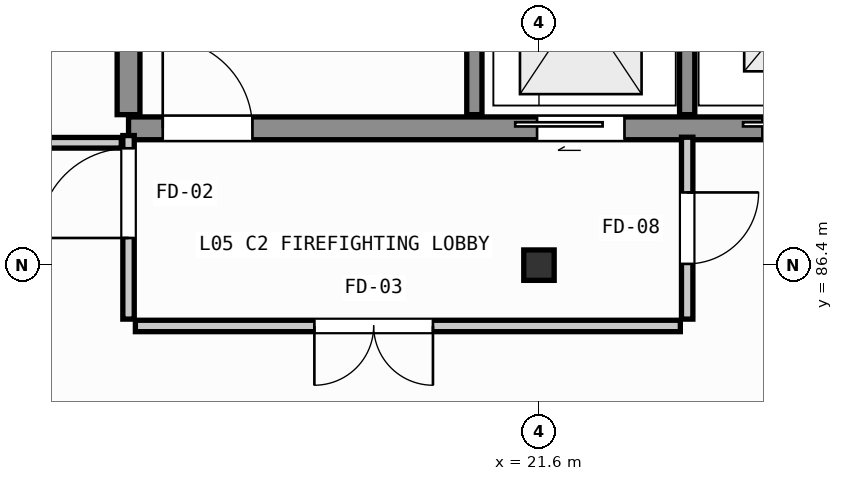
"""IFC4 building model, lengths in metres.
Left out: names, types, materials, properties, quantities, classifications, styles, units other than length and angle.
Written with IfcOpenShell. Run it as: python <this file> out.ifc"""

import sys

from ifc_helpers import new_model, si_unit, direction, frame, frame_2d, origin, origin_2d, place, context, subcontext, project, spatial, rectangle, extrude, element, fill, save


model = new_model("IFC4")
c1 = context("Model", 3, precision=1e-05, world=origin(), true_north=direction((0.0, 1.0)))
c2 = subcontext(c1, "Body", "Model", "MODEL_VIEW")
j1 = project(units=[si_unit("LENGTHUNIT", "METRE"), si_unit("PLANEANGLEUNIT", "RADIAN")], contexts=[c1])
p1 = place(None, origin())
s1 = spatial("IfcSite", under=j1, at=p1, CompositionType="ELEMENT")
p2 = place(p1, origin())
s2 = spatial("IfcBuilding", under=s1, at=p2, CompositionType="ELEMENT")
p3 = place(p2, frame((0.0, 0.0, 17.7)))
s3 = spatial("IfcBuildingStorey", under=s2, at=p3, CompositionType="ELEMENT", Elevation=17.7)
p4 = place(p3, frame((21.6, 86.4, 0.0), z_axis=(0.0, 0.0, 1.0), x_axis=(1.0, 0.0, 0.0)))
e1 = element("IfcColumn", 1, at=p4, inside=s3, PredefinedType="COLUMN", context=c2, shape_type="SweptSolid", body=[
    extrude(rectangle(XDim=0.4, YDim=0.4, at=origin_2d()), origin(), (0.0, 0.0, 1.0), 3.69),
])
p5 = place(p3, frame((16.2, 88.2, 0.0), z_axis=(0.0, 0.0, 1.0), x_axis=(1.0, 0.0, 0.0)))
e2 = element("IfcWall", 2, at=p5, inside=s3, PredefinedType="SHEAR", context=c2, shape_type="SweptSolid", body=[
    extrude(rectangle(XDim=10.8, YDim=0.3, at=frame_2d((5.4, 0.0))), origin(), (0.0, 0.0, 1.0), 3.9),
])
p6 = place(p5, frame((0.45, 0.0, 0.0)))
e3 = element("IfcOpeningElement", 3, at=p6, cuts=e2, PredefinedType="OPENING", context=c2, shape_type="SweptSolid", body=[
    extrude(rectangle(XDim=1.18, YDim=2.16, at=frame_2d((0.59, 1.08))), frame((0.0, 0.16, 0.0), z_axis=(0.0, -1.0, 0.0), x_axis=(1.0, 0.0, 0.0)), (0.0, 0.0, 1.0), 0.32),
])
p7 = place(p5, frame((5.375, 0.0, 0.0)))
e4 = element("IfcOpeningElement", 4, at=p7, cuts=e2, PredefinedType="OPENING", context=c2, shape_type="SweptSolid", body=[
    extrude(rectangle(XDim=1.15, YDim=2.15, at=frame_2d((0.575, 1.075))), frame((0.0, 0.16, 0.0), z_axis=(0.0, -1.0, 0.0), x_axis=(1.0, 0.0, 0.0)), (0.0, 0.0, 1.0), 0.32),
])
p8 = place(p5, frame((8.34, 0.0, 0.0)))
e5 = element("IfcOpeningElement", 5, at=p8, cuts=e2, PredefinedType="OPENING", context=c2, shape_type="SweptSolid", body=[
    extrude(rectangle(XDim=1.02, YDim=2.12, at=frame_2d((0.51, 1.06))), frame((0.0, 0.16, 0.0), z_axis=(0.0, -1.0, 0.0), x_axis=(1.0, 0.0, 0.0)), (0.0, 0.0, 1.0), 0.32),
])
p9 = place(p3, frame((16.2, 88.38, 0.0), z_axis=(0.0, 0.0, 1.0), x_axis=(0.0, 1.0, 0.0)))
e6 = element("IfcWall", 6, at=p9, inside=s3, PredefinedType="SHEAR", context=c2, shape_type="SweptSolid", body=[
    extrude(rectangle(XDim=6.24, YDim=0.3, at=frame_2d((3.12, 0.0))), origin(), (0.0, 0.0, 1.0), 3.9),
])
for number, where, z_axis, x_axis in (
    (7, (20.75, 88.38, 0.0), (0.0, 0.0, 1.0), (0.0, 1.0, 0.0)),
    (8, (23.55, 88.38, 0.0), (0.0, 0.0, 1.0), (0.0, 1.0, 0.0)),
):
    element("IfcWall", number, at=place(p3, frame(where, z_axis=z_axis, x_axis=x_axis)), inside=s3, PredefinedType="SHEAR", context=c2, shape_type="SweptSolid", body=[
        extrude(rectangle(XDim=3.15, YDim=0.2, at=frame_2d((1.575, 0.0))), origin(), (0.0, 0.0, 1.0), 3.9),
    ])
p10 = place(p3, frame((16.2, 85.69, 0.0), z_axis=(0.0, 0.0, 1.0), x_axis=(0.0, 1.0, 0.0)))
e9 = element("IfcWall", 9, at=p10, inside=s3, PredefinedType="PARTITIONING", context=c2, shape_type="SweptSolid", body=[
    extrude(rectangle(XDim=2.415, YDim=0.15, at=frame_2d((1.208, 0.0))), origin(), (0.0, 0.0, 1.0), 3.05),
])
p11 = place(p10, frame((1.067, 0.0, 0.0)))
e10 = element("IfcOpeningElement", 10, at=p11, cuts=e9, PredefinedType="OPENING", context=c2, shape_type="SweptSolid", body=[
    extrude(rectangle(XDim=1.18, YDim=2.16, at=frame_2d((0.59, 1.08))), frame((0.0, 0.085, 0.0), z_axis=(0.0, -1.0, 0.0), x_axis=(1.0, 0.0, 0.0)), (0.0, 0.0, 1.0), 0.17),
])
p12 = place(p3, frame((23.55, 88.083, 0.0), z_axis=(0.0, 0.0, 1.0), x_axis=(0.0, -1.0, 0.0)))
e11 = element("IfcWall", 11, at=p12, inside=s3, PredefinedType="PARTITIONING", context=c2, shape_type="SweptSolid", body=[
    extrude(rectangle(XDim=2.393, YDim=0.15, at=frame_2d((1.197, 0.0))), origin(), (0.0, 0.0, 1.0), 3.05),
])
p13 = place(p12, frame((0.727, 0.0, 0.0)))
e12 = element("IfcOpeningElement", 12, at=p13, cuts=e11, PredefinedType="OPENING", context=c2, shape_type="SweptSolid", body=[
    extrude(rectangle(XDim=0.94, YDim=2.1, at=frame_2d((0.47, 1.05))), frame((0.0, 0.085, 0.0), z_axis=(0.0, -1.0, 0.0), x_axis=(1.0, 0.0, 0.0)), (0.0, 0.0, 1.0), 0.17),
])
p14 = place(p3, frame((23.46, 85.6, 0.0), z_axis=(0.0, 0.0, 1.0), x_axis=(-1.0, 0.0, 0.0)))
e13 = element("IfcWall", 13, at=p14, inside=s3, PredefinedType="PARTITIONING", context=c2, shape_type="SweptSolid", body=[
    extrude(rectangle(XDim=7.17, YDim=0.15, at=frame_2d((3.585, 0.0))), origin(), (0.0, 0.0, 1.0), 3.67),
])
p15 = place(p14, frame((3.255, 0.0, 0.0)))
e14 = element("IfcOpeningElement", 14, at=p15, cuts=e13, PredefinedType="OPENING", context=c2, shape_type="SweptSolid", body=[
    extrude(rectangle(XDim=1.56, YDim=2.22, at=frame_2d((0.78, 1.11))), frame((0.0, 0.085, 0.0), z_axis=(0.0, -1.0, 0.0), x_axis=(1.0, 0.0, 0.0)), (0.0, 0.0, 1.0), 0.17),
])
p16 = place(p3, frame((16.105, 88.01, 0.0), z_axis=(0.0, 0.0, 1.0), x_axis=(-1.0, 0.0, 0.0)))
e15 = element("IfcWall", 15, at=p16, inside=s3, PredefinedType="PARTITIONING", context=c2, shape_type="SweptSolid", body=[
    extrude(rectangle(XDim=1.663, YDim=0.14, at=frame_2d((0.832, 0.0))), origin(), (0.0, 0.0, 1.0), 3.13),
])
p17 = place(p6, origin())
e16 = element("IfcDoor", 16, at=p17, inside=s3, OperationType="SINGLE_SWING_LEFT", PredefinedType="DOOR", context=c2, shape_type="SweptSolid", body=[
    extrude(rectangle(XDim=1.18, YDim=2.16, at=frame_2d((0.59, 1.08))), frame((0.0, 0.025, 0.0), z_axis=(0.0, -1.0, 0.0), x_axis=(1.0, 0.0, 0.0)), (0.0, 0.0, 1.0), 0.05),
])
fill(e3, e16)
p18 = place(p7, origin())
e17 = element("IfcDoor", 17, at=p18, inside=s3, OperationType="DOUBLE_DOOR_SLIDING", PredefinedType="DOOR", context=c2, shape_type="SweptSolid", body=[
    extrude(rectangle(XDim=1.15, YDim=2.15, at=frame_2d((0.575, 1.075))), frame((0.0, 0.025, 0.0), z_axis=(0.0, -1.0, 0.0), x_axis=(1.0, 0.0, 0.0)), (0.0, 0.0, 1.0), 0.05),
])
fill(e4, e17)
p19 = place(p8, origin())
e18 = element("IfcDoor", 18, at=p19, inside=s3, OperationType="SLIDING_TO_LEFT", PredefinedType="DOOR", context=c2, shape_type="SweptSolid", body=[
    extrude(rectangle(XDim=1.02, YDim=2.12, at=frame_2d((0.51, 1.06))), frame((0.0, 0.025, 0.0), z_axis=(0.0, -1.0, 0.0), x_axis=(1.0, 0.0, 0.0)), (0.0, 0.0, 1.0), 0.05),
])
fill(e5, e18)
p20 = place(p11, origin())
e19 = element("IfcDoor", 19, at=p20, inside=s3, OperationType="SINGLE_SWING_RIGHT", PredefinedType="DOOR", context=c2, shape_type="SweptSolid", body=[
    extrude(rectangle(XDim=1.18, YDim=2.16, at=frame_2d((0.59, 1.08))), frame((0.0, 0.025, 0.0), z_axis=(0.0, -1.0, 0.0), x_axis=(1.0, 0.0, 0.0)), (0.0, 0.0, 1.0), 0.05),
])
fill(e10, e19)
p21 = place(p13, origin())
e20 = element("IfcDoor", 20, at=p21, inside=s3, OperationType="SINGLE_SWING_LEFT", PredefinedType="DOOR", context=c2, shape_type="SweptSolid", body=[
    extrude(rectangle(XDim=0.94, YDim=2.1, at=frame_2d((0.47, 1.05))), frame((0.0, 0.025, 0.0), z_axis=(0.0, -1.0, 0.0), x_axis=(1.0, 0.0, 0.0)), (0.0, 0.0, 1.0), 0.05),
])
fill(e12, e20)
p22 = place(p15, origin())
e21 = element("IfcDoor", 21, at=p22, inside=s3, OperationType="DOUBLE_DOOR_SINGLE_SWING", PredefinedType="DOOR", context=c2, shape_type="SweptSolid", body=[
    extrude(rectangle(XDim=1.56, YDim=2.22, at=frame_2d((0.78, 1.11))), frame((0.0, 0.025, 0.0), z_axis=(0.0, -1.0, 0.0), x_axis=(1.0, 0.0, 0.0)), (0.0, 0.0, 1.0), 0.05),
])
fill(e14, e21)
save(model, sys.argv[1])
